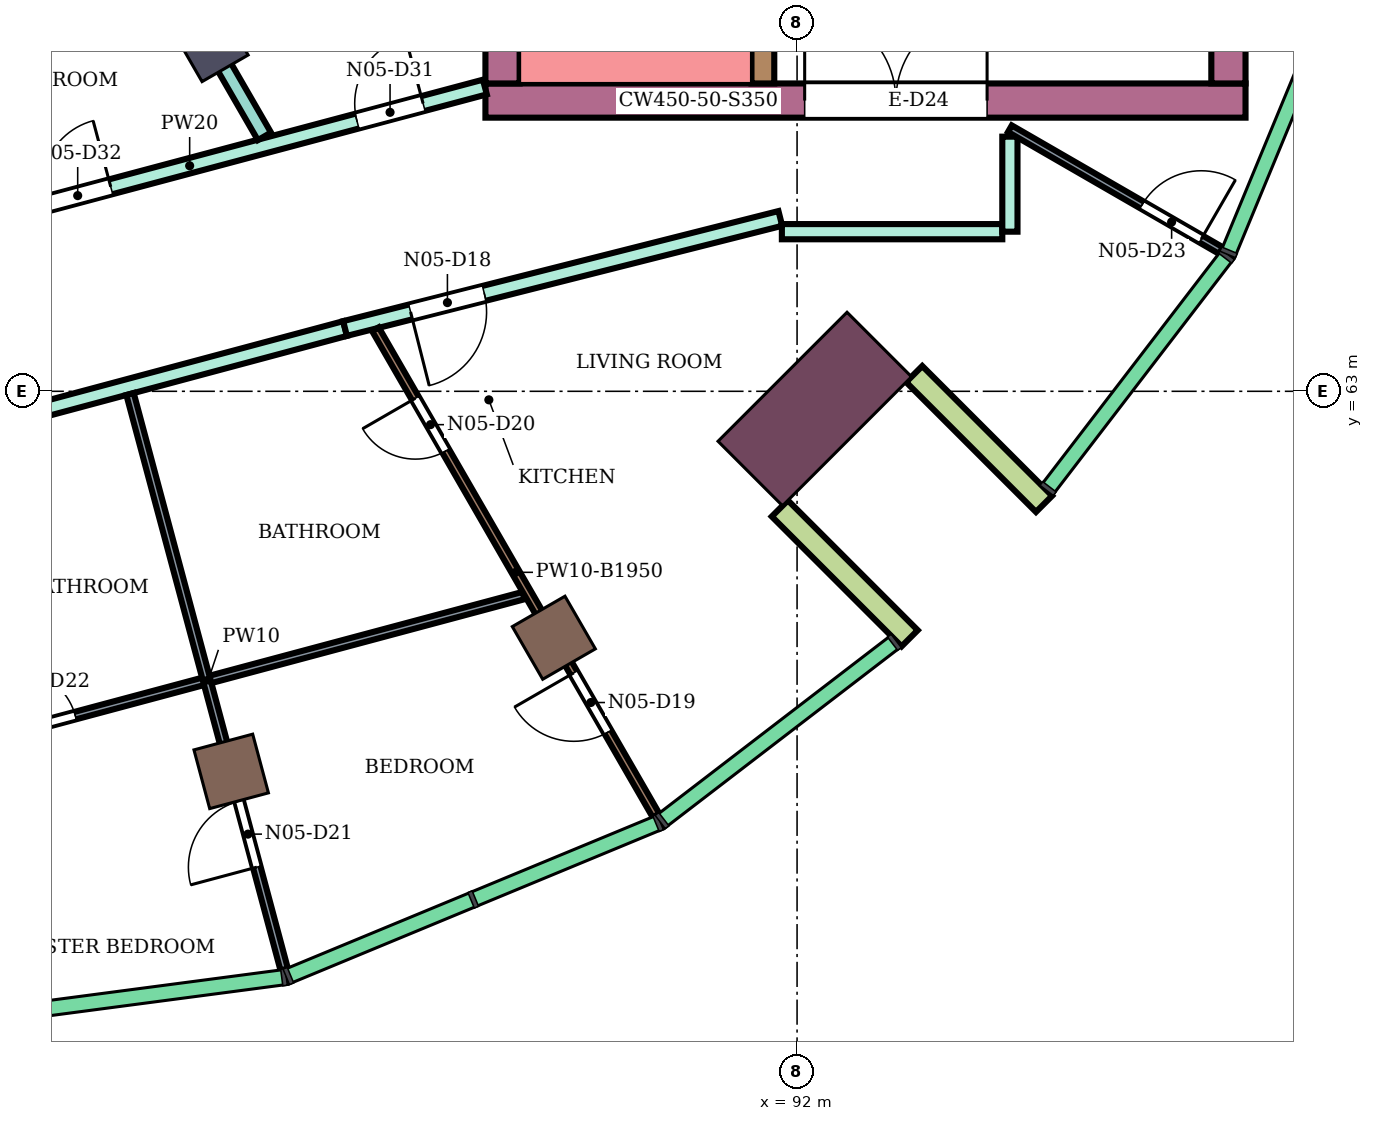
"""IFC4 building model, lengths in metres.
Left out: names, types, materials, properties, quantities, classifications, styles, units other than length and angle.
Written with IfcOpenShell. Run it as: python <this file> out.ifc"""

import sys

from ifc_helpers import new_model, si_unit, direction, frame, frame_2d, origin, origin_2d, place, context, subcontext, project, spatial, rectangle, extrude, element, fill, save


model = new_model("IFC4")
c1 = context("Model", 3, precision=1e-05, world=origin(), true_north=direction((0.0, 1.0)))
c2 = subcontext(c1, "Body", "Model", "MODEL_VIEW")
j1 = project(units=[si_unit("LENGTHUNIT", "METRE"), si_unit("PLANEANGLEUNIT", "RADIAN")], contexts=[c1])
p1 = place(None, origin())
s1 = spatial("IfcSite", under=j1, at=p1, CompositionType="ELEMENT")
p2 = place(p1, origin())
s2 = spatial("IfcBuilding", under=s1, at=p2, CompositionType="ELEMENT")
p3 = place(p2, frame((0.0, 0.0, 323.7)))
s3 = spatial("IfcBuildingStorey", under=s2, at=p3, CompositionType="ELEMENT", Elevation=323.7)
for number, where, z_axis, x_axis in (
    (1, (84.555, 58.0, 0.0), (0.0, 0.0, 1.0), (0.259, -0.966, 0.0)),
    (2, (88.8, 59.758, 0.0), (0.0, 0.0, 1.0), (0.5, -0.866, 0.0)),
):
    element("IfcColumn", number, at=place(p3, frame(where, z_axis=z_axis, x_axis=x_axis)), inside=s3, PredefinedType="COLUMN", context=c2, shape_type="SweptSolid", body=[
        extrude(rectangle(XDim=0.8, YDim=0.8, at=origin_2d()), origin(), (0.0, 0.0, 1.0), 4.4),
    ])
p4 = place(p3, frame((84.3, 67.552, 0.0), z_axis=(0.0, 0.0, 1.0), x_axis=(0.5, -0.866025403784, 0.0)))
e3 = element("IfcColumn", 3, at=p4, inside=s3, PredefinedType="COLUMN", context=c2, shape_type="SweptSolid", body=[
    extrude(rectangle(XDim=0.7, YDim=0.7, at=origin_2d()), origin(), (0.0, 0.0, 1.0), 4.4),
])
p5 = place(p3, frame((92.233, 62.767, 0.0), z_axis=(0.0, 0.0, 1.0), x_axis=(0.707106781187, -0.707106781187, 0.0)))
e4 = element("IfcColumn", 4, at=p5, inside=s3, PredefinedType="COLUMN", context=c2, shape_type="SweptSolid", body=[
    extrude(rectangle(XDim=1.2, YDim=2.4, at=origin_2d()), origin(), (0.0, 0.0, 1.0), 4.4),
])
p6 = place(p3, frame((87.9, 66.825, 0.0), z_axis=(0.0, 0.0, 1.0), x_axis=(1.0, 0.0, 0.0)))
e5 = element("IfcWall", 5, at=p6, inside=s3, PredefinedType="SHEAR", context=c2, shape_type="SweptSolid", body=[
    extrude(rectangle(XDim=10.0, YDim=0.45, at=frame_2d((5.0, 0.0))), origin(), (0.0, 0.0, 1.0), 4.05),
])
p7 = place(p6, frame((4.2, 0.0, 0.0)))
e6 = element("IfcOpeningElement", 6, at=p7, cuts=e5, PredefinedType="OPENING", context=c2, shape_type="SweptSolid", body=[
    extrude(rectangle(XDim=2.4, YDim=2.4, at=frame_2d((1.2, 1.2))), frame((0.0, 0.235, 0.0), z_axis=(0.0, -1.0, 0.0), x_axis=(1.0, 0.0, 0.0)), (0.0, 0.0, 1.0), 0.47),
])
p8 = place(p3, frame((88.125, 67.05, 0.0), z_axis=(0.0, 0.0, 1.0), x_axis=(0.0, 1.0, 0.0)))
e7 = element("IfcWall", 7, at=p8, inside=s3, PredefinedType="SHEAR", context=c2, shape_type="SweptSolid", body=[
    extrude(rectangle(XDim=7.95, YDim=0.45, at=frame_2d((3.975, 0.0))), origin(), (0.0, 0.0, 1.0), 4.05),
])
p9 = place(p3, frame((97.675, 67.05, 0.0), z_axis=(0.0, 0.0, 1.0), x_axis=(0.0, 1.0, 0.0)))
e8 = element("IfcWall", 8, at=p9, inside=s3, PredefinedType="SHEAR", context=c2, shape_type="SweptSolid", body=[
    extrude(rectangle(XDim=3.7, YDim=0.45, at=frame_2d((1.85, 0.0))), origin(), (0.0, 0.0, 1.0), 4.05),
])
p10 = place(p3, frame((91.55, 67.05, 0.0), z_axis=(0.0, 0.0, 1.0), x_axis=(0.0, 1.0, 0.0)))
e9 = element("IfcWall", 9, at=p10, inside=s3, PredefinedType="SHEAR", context=c2, shape_type="SweptSolid", body=[
    extrude(rectangle(XDim=7.95, YDim=0.3, at=frame_2d((3.975, 0.0))), origin(), (0.0, 0.0, 1.0), 4.05),
])
p11 = place(p10, frame((0.6, 0.0, 0.0)))
e10 = element("IfcOpeningElement", 10, at=p11, cuts=e9, PredefinedType="OPENING", context=c2, shape_type="SweptSolid", body=[
    extrude(rectangle(XDim=0.9, YDim=2.1, at=frame_2d((0.45, 1.05))), frame((0.0, 0.16, 0.0), z_axis=(0.0, -1.0, 0.0), x_axis=(1.0, 0.0, 0.0)), (0.0, 0.0, 1.0), 0.32),
])
for number, where, z_axis, x_axis in (
    (11, (91.773, 61.459, 0.0), (0.0, 0.0, 1.0), (0.707, -0.707, 0.0)),
    (12, (93.541, 63.227, 0.0), (0.0, 0.0, 1.0), (0.707, -0.707, 0.0)),
):
    element("IfcWall", number, at=place(p3, frame(where, z_axis=z_axis, x_axis=x_axis)), inside=s3, PredefinedType="NOTDEFINED", context=c2, shape_type="SweptSolid", body=[
        extrude(rectangle(XDim=2.416, YDim=0.3, at=frame_2d((1.208, 0.0))), origin(), (0.0, 0.0, 1.0), 4.4),
    ])
p12 = place(p3, frame((80.0, 67.396, 0.0), z_axis=(0.0, 0.0, 1.0), x_axis=(0.965933654434, 0.258789828301, 0.0)))
e13 = element("IfcWall", 13, at=p12, inside=s3, PredefinedType="NOTDEFINED", context=c2, shape_type="SweptSolid", body=[
    extrude(rectangle(XDim=3.936, YDim=0.2, at=frame_2d((1.968, 0.0))), origin(), (0.0, 0.0, 1.0), 4.4),
])
p13 = place(p12, frame((0.468, 0.0, 0.9)))
e14 = element("IfcOpeningElement", 14, at=p13, cuts=e13, PredefinedType="OPENING", context=c2, shape_type="SweptSolid", body=[
    extrude(rectangle(XDim=3.0, YDim=2.3, at=frame_2d((1.5, 1.15))), frame((0.0, 0.11, 0.0), z_axis=(0.0, -1.0, 0.0), x_axis=(1.0, 0.0, 0.0)), (0.0, 0.0, 1.0), 0.22),
])
p14 = place(p3, frame((80.125, 64.932, 0.0), z_axis=(0.0, 0.0, 1.0), x_axis=(0.966236955806, 0.257655089674, 0.0)))
e15 = element("IfcWall", 15, at=p14, inside=s3, PredefinedType="PARTITIONING", context=c2, shape_type="SweptSolid", body=[
    extrude(rectangle(XDim=8.039, YDim=0.2, at=frame_2d((4.02, 0.0))), origin(), (0.0, 0.0, 1.0), 3.95),
])
p15 = place(p14, frame((6.298, 0.0, 0.0)))
e16 = element("IfcOpeningElement", 16, at=p15, cuts=e15, PredefinedType="OPENING", context=c2, shape_type="SweptSolid", body=[
    extrude(rectangle(XDim=0.9, YDim=2.1, at=frame_2d((0.45, 1.05))), frame((0.0, 0.11, 0.0), z_axis=(0.0, -1.0, 0.0), x_axis=(1.0, 0.0, 0.0)), (0.0, 0.0, 1.0), 0.22),
])
p16 = place(p14, frame((2.045, 0.0, 0.0)))
e17 = element("IfcOpeningElement", 17, at=p16, cuts=e15, PredefinedType="OPENING", context=c2, shape_type="SweptSolid", body=[
    extrude(rectangle(XDim=0.9, YDim=2.1, at=frame_2d((0.45, 1.05))), frame((0.0, 0.11, 0.0), z_axis=(0.0, -1.0, 0.0), x_axis=(1.0, 0.0, 0.0)), (0.0, 0.0, 1.0), 0.22),
])
p17 = place(p3, frame((80.0, 62.204, 0.0), z_axis=(0.0, 0.0, 1.0), x_axis=(0.965938139786, 0.258773086132, 0.0)))
e18 = element("IfcWall", 18, at=p17, inside=s3, PredefinedType="PARTITIONING", context=c2, shape_type="SweptSolid", body=[
    extrude(rectangle(XDim=6.266, YDim=0.2, at=frame_2d((3.133, 0.0))), origin(), (0.0, 0.0, 1.0), 3.95),
])
p18 = place(p3, frame((83.85, 68.333, 0.0), z_axis=(0.0, 0.0, 1.0), x_axis=(0.500080019051, -0.865979199835, 0.0)))
e19 = element("IfcWall", 19, at=p18, inside=s3, PredefinedType="PARTITIONING", context=c2, shape_type="SweptSolid", body=[
    extrude(rectangle(XDim=2.285, YDim=0.2, at=frame_2d((1.143, 0.0))), origin(), (0.0, 0.0, 1.0), 2.45),
])
p19 = place(p3, frame((86.053, 63.826, 0.0), z_axis=(0.0, 0.0, 1.0), x_axis=(0.969480070232, 0.245170131586, 0.0)))
e20 = element("IfcWall", 20, at=p19, inside=s3, PredefinedType="PARTITIONING", context=c2, shape_type="SweptSolid", body=[
    extrude(rectangle(XDim=5.907, YDim=0.2, at=frame_2d((2.954, 0.0))), origin(), (0.0, 0.0, 1.0), 3.95),
])
p20 = place(p19, frame((0.889, 0.0, 0.0)))
e21 = element("IfcOpeningElement", 21, at=p20, cuts=e20, PredefinedType="OPENING", context=c2, shape_type="SweptSolid", body=[
    extrude(rectangle(XDim=1.0, YDim=2.1, at=frame_2d((0.5, 1.05))), frame((0.0, 0.11, 0.0), z_axis=(0.0, -1.0, 0.0), x_axis=(1.0, 0.0, 0.0)), (0.0, 0.0, 1.0), 0.22),
])
p21 = place(p3, frame((91.8, 65.1, 0.0), z_axis=(0.0, 0.0, 1.0), x_axis=(1.0, 0.0, 0.0)))
e22 = element("IfcWall", 22, at=p21, inside=s3, PredefinedType="PARTITIONING", context=c2, shape_type="SweptSolid", body=[
    extrude(rectangle(XDim=2.9, YDim=0.2, at=frame_2d((1.45, 0.0))), origin(), (0.0, 0.0, 1.0), 3.95),
])
p22 = place(p3, frame((94.8, 65.1, 0.0), z_axis=(0.0, 0.0, 1.0), x_axis=(0.0, 1.0, 0.0)))
e23 = element("IfcWall", 23, at=p22, inside=s3, PredefinedType="PARTITIONING", context=c2, shape_type="SweptSolid", body=[
    extrude(rectangle(XDim=1.25, YDim=0.2, at=frame_2d((0.625, 0.0))), origin(), (0.0, 0.0, 1.0), 3.95),
])
p23 = place(p3, frame((80.106, 58.092, 0.0), z_axis=(0.0, 0.0, 1.0), x_axis=(0.965971139599, 0.258649874274, 0.0)))
e24 = element("IfcWall", 24, at=p23, inside=s3, PredefinedType="PARTITIONING", context=c2, shape_type="SweptSolid", body=[
    extrude(rectangle(XDim=8.588, YDim=0.1, at=frame_2d((4.294, 0.0))), origin(), (0.0, 0.0, 1.0), 3.95),
])
p24 = place(p23, frame((1.682, 0.0, 0.0)))
e25 = element("IfcOpeningElement", 25, at=p24, cuts=e24, PredefinedType="OPENING", context=c2, shape_type="SweptSolid", body=[
    extrude(rectangle(XDim=0.8, YDim=2.1, at=frame_2d((0.4, 1.05))), frame((0.0, 0.06, 0.0), z_axis=(0.0, -1.0, 0.0), x_axis=(1.0, 0.0, 0.0)), (0.0, 0.0, 1.0), 0.12),
])
p25 = place(p3, frame((83.224, 62.964, 0.0), z_axis=(0.0, 0.0, 1.0), x_axis=(0.258779160476, -0.96593651246, 0.0)))
e26 = element("IfcWall", 26, at=p25, inside=s3, PredefinedType="PARTITIONING", context=c2, shape_type="SweptSolid", body=[
    extrude(rectangle(XDim=7.838, YDim=0.1, at=frame_2d((3.919, 0.0))), origin(), (0.0, 0.0, 1.0), 3.95),
])
p26 = place(p25, frame((5.544, 0.0, 0.0)))
e27 = element("IfcOpeningElement", 27, at=p26, cuts=e26, PredefinedType="OPENING", context=c2, shape_type="SweptSolid", body=[
    extrude(rectangle(XDim=0.9, YDim=2.1, at=frame_2d((0.45, 1.05))), frame((0.0, 0.06, 0.0), z_axis=(0.0, -1.0, 0.0), x_axis=(1.0, 0.0, 0.0)), (0.0, 0.0, 1.0), 0.12),
])
p27 = place(p3, frame((86.453, 63.817, 0.0), z_axis=(0.0, 0.0, 1.0), x_axis=(0.499822611913, -0.866127794624, 0.0)))
e28 = element("IfcWall", 28, at=p27, inside=s3, PredefinedType="PARTITIONING", context=c2, shape_type="SweptSolid", body=[
    extrude(rectangle(XDim=7.385, YDim=0.1, at=frame_2d((3.693, 0.0))), origin(), (0.0, 0.0, 1.0), 2.45),
])
p28 = place(p27, frame((5.22, 0.0, 0.0)))
e29 = element("IfcOpeningElement", 29, at=p28, cuts=e28, PredefinedType="OPENING", context=c2, shape_type="SweptSolid", body=[
    extrude(rectangle(XDim=0.9, YDim=2.1, at=frame_2d((0.45, 1.05))), frame((0.0, 0.06, 0.0), z_axis=(0.0, -1.0, 0.0), x_axis=(1.0, 0.0, 0.0)), (0.0, 0.0, 1.0), 0.12),
])
p29 = place(p27, frame((1.05, 0.0, 0.0)))
e30 = element("IfcOpeningElement", 30, at=p29, cuts=e28, PredefinedType="OPENING", context=c2, shape_type="SweptSolid", body=[
    extrude(rectangle(XDim=0.8, YDim=2.1, at=frame_2d((0.4, 1.05))), frame((0.0, 0.06, 0.0), z_axis=(0.0, -1.0, 0.0), x_axis=(1.0, 0.0, 0.0)), (0.0, 0.0, 1.0), 0.12),
])
p30 = place(p3, frame((94.8, 66.455, 0.0), z_axis=(0.0, 0.0, 1.0), x_axis=(0.866056279496, -0.499946517884, 0.0)))
e31 = element("IfcWall", 31, at=p30, inside=s3, PredefinedType="PARTITIONING", context=c2, shape_type="SweptSolid", body=[
    extrude(rectangle(XDim=3.207, YDim=0.1, at=frame_2d((1.604, 0.0))), origin(), (0.0, 0.0, 1.0), 3.95),
])
p31 = place(p30, frame((2.007, 0.0, 0.0)))
e32 = element("IfcOpeningElement", 32, at=p31, cuts=e31, PredefinedType="OPENING", context=c2, shape_type="SweptSolid", body=[
    extrude(rectangle(XDim=0.9, YDim=2.1, at=frame_2d((0.45, 1.05))), frame((0.0, 0.06, 0.0), z_axis=(0.0, -1.0, 0.0), x_axis=(1.0, 0.0, 0.0)), (0.0, 0.0, 1.0), 0.12),
])
p32 = place(p20, frame((1.0, 0.0, 0.0), z_axis=(0.0, 0.0, 1.0), x_axis=(-1.0, 0.0, 0.0)))
e33 = element("IfcDoor", 33, at=p32, inside=s3, OperationType="SINGLE_SWING_RIGHT", PredefinedType="DOOR", context=c2, shape_type="SweptSolid", body=[
    extrude(rectangle(XDim=1.0, YDim=2.1, at=frame_2d((0.5, 1.05))), frame((0.0, 0.025, 0.0), z_axis=(0.0, -1.0, 0.0), x_axis=(1.0, 0.0, 0.0)), (0.0, 0.0, 1.0), 0.05),
])
fill(e21, e33)
p33 = place(p28, frame((0.9, 0.0, 0.0), z_axis=(0.0, 0.0, 1.0), x_axis=(-1.0, 0.0, 0.0)))
e34 = element("IfcDoor", 34, at=p33, inside=s3, OperationType="SINGLE_SWING_RIGHT", PredefinedType="DOOR", context=c2, shape_type="SweptSolid", body=[
    extrude(rectangle(XDim=0.9, YDim=2.1, at=frame_2d((0.45, 1.05))), frame((0.0, 0.025, 0.0), z_axis=(0.0, -1.0, 0.0), x_axis=(1.0, 0.0, 0.0)), (0.0, 0.0, 1.0), 0.05),
])
fill(e29, e34)
p34 = place(p29, frame((0.8, 0.0, 0.0), z_axis=(0.0, 0.0, 1.0), x_axis=(-1.0, 0.0, 0.0)))
e35 = element("IfcDoor", 35, at=p34, inside=s3, OperationType="SINGLE_SWING_RIGHT", PredefinedType="DOOR", context=c2, shape_type="SweptSolid", body=[
    extrude(rectangle(XDim=0.8, YDim=2.1, at=frame_2d((0.4, 1.05))), frame((0.0, 0.025, 0.0), z_axis=(0.0, -1.0, 0.0), x_axis=(1.0, 0.0, 0.0)), (0.0, 0.0, 1.0), 0.05),
])
fill(e30, e35)
p35 = place(p26, frame((0.9, 0.0, 0.0), z_axis=(0.0, 0.0, 1.0), x_axis=(-1.0, 0.0, 0.0)))
e36 = element("IfcDoor", 36, at=p35, inside=s3, OperationType="SINGLE_SWING_LEFT", PredefinedType="DOOR", context=c2, shape_type="SweptSolid", body=[
    extrude(rectangle(XDim=0.9, YDim=2.1, at=frame_2d((0.45, 1.05))), frame((0.0, 0.025, 0.0), z_axis=(0.0, -1.0, 0.0), x_axis=(1.0, 0.0, 0.0)), (0.0, 0.0, 1.0), 0.05),
])
fill(e27, e36)
p36 = place(p24, origin())
e37 = element("IfcDoor", 37, at=p36, inside=s3, OperationType="SINGLE_SWING_LEFT", PredefinedType="DOOR", context=c2, shape_type="SweptSolid", body=[
    extrude(rectangle(XDim=0.8, YDim=2.1, at=frame_2d((0.4, 1.05))), frame((0.0, 0.025, 0.0), z_axis=(0.0, -1.0, 0.0), x_axis=(1.0, 0.0, 0.0)), (0.0, 0.0, 1.0), 0.05),
])
fill(e25, e37)
p37 = place(p31, origin())
e38 = element("IfcDoor", 38, at=p37, inside=s3, OperationType="SINGLE_SWING_RIGHT", PredefinedType="DOOR", context=c2, shape_type="SweptSolid", body=[
    extrude(rectangle(XDim=0.9, YDim=2.1, at=frame_2d((0.45, 1.05))), frame((0.0, 0.025, 0.0), z_axis=(0.0, -1.0, 0.0), x_axis=(1.0, 0.0, 0.0)), (0.0, 0.0, 1.0), 0.05),
])
fill(e32, e38)
p38 = place(p15, origin())
e39 = element("IfcDoor", 39, at=p38, inside=s3, OperationType="SINGLE_SWING_RIGHT", PredefinedType="DOOR", context=c2, shape_type="SweptSolid", body=[
    extrude(rectangle(XDim=0.9, YDim=2.1, at=frame_2d((0.45, 1.05))), frame((0.0, 0.025, 0.0), z_axis=(0.0, -1.0, 0.0), x_axis=(1.0, 0.0, 0.0)), (0.0, 0.0, 1.0), 0.05),
])
fill(e16, e39)
p39 = place(p16, origin())
e40 = element("IfcDoor", 40, at=p39, inside=s3, OperationType="SINGLE_SWING_RIGHT", PredefinedType="DOOR", context=c2, shape_type="SweptSolid", body=[
    extrude(rectangle(XDim=0.9, YDim=2.1, at=frame_2d((0.45, 1.05))), frame((0.0, 0.025, 0.0), z_axis=(0.0, -1.0, 0.0), x_axis=(1.0, 0.0, 0.0)), (0.0, 0.0, 1.0), 0.05),
])
fill(e17, e40)
p40 = place(p7, origin())
e41 = element("IfcDoor", 41, at=p40, inside=s3, OperationType="DOUBLE_DOOR_SINGLE_SWING", PredefinedType="DOOR", context=c2, shape_type="SweptSolid", body=[
    extrude(rectangle(XDim=2.4, YDim=2.4, at=frame_2d((1.2, 1.2))), frame((0.0, 0.025, 0.0), z_axis=(0.0, -1.0, 0.0), x_axis=(1.0, 0.0, 0.0)), (0.0, 0.0, 1.0), 0.05),
])
fill(e6, e41)
save(model, sys.argv[1])
